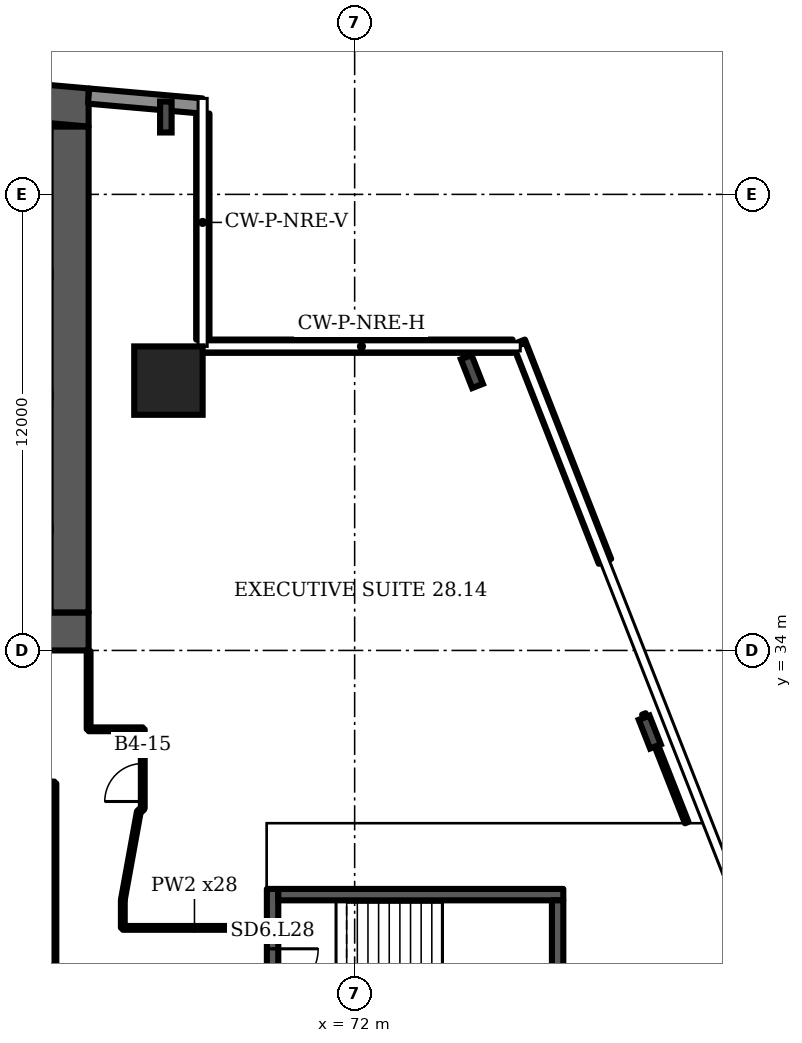
"""IFC4 building model, lengths in metres.
Left out: names, types, materials, properties, quantities, classifications, styles, units other than length and angle.
Written with IfcOpenShell. Run it as: python <this file> out.ifc"""

import sys

from ifc_helpers import new_model, si_unit, direction, frame, frame_2d, origin, origin_2d, place, context, subcontext, project, spatial, polyline, rectangle, i_section, outline, extrude, element, fill, save


model = new_model("IFC4")
c1 = context("Model", 3, precision=1e-05, world=origin(), true_north=direction((0.0, 1.0)))
c2 = subcontext(c1, "Body", "Model", "MODEL_VIEW")
j1 = project(units=[si_unit("LENGTHUNIT", "METRE"), si_unit("PLANEANGLEUNIT", "RADIAN")], contexts=[c1])
p1 = place(None, origin())
s1 = spatial("IfcSite", under=j1, at=p1, CompositionType="ELEMENT")
p2 = place(p1, origin())
s2 = spatial("IfcBuilding", under=s1, at=p2, CompositionType="ELEMENT")
p3 = place(p2, frame((0.0, 0.0, 121.9)))
s3 = spatial("IfcBuildingStorey", under=s2, at=p3, CompositionType="ELEMENT", Elevation=121.9)
p4 = place(p3, origin())
e1 = element("IfcWall", 1, at=p4, inside=s3, PredefinedType="SHEAR", context=c2, shape_type="SweptSolid", body=[
    extrude(outline(polyline([(16.0, 47.784), (40.5, 49.927), (65.0, 47.784), (65.0, 48.787), (40.5, 50.931), (16.0, 48.787), (16.0, 47.784)])), origin(), (0.0, 0.0, 1.0), 3.6),
])
p5 = place(p3, frame((16.0, 34.5, 0.0), z_axis=(0.0, 0.0, 1.0), x_axis=(1.0, 0.0, 0.0)))
e2 = element("IfcWall", 2, at=p5, inside=s3, PredefinedType="SHEAR", context=c2, shape_type="SweptSolid", body=[
    extrude(rectangle(XDim=49.0, YDim=1.0, at=frame_2d((24.5, 0.0))), origin(), (0.0, 0.0, 1.0), 3.6),
])
p6 = place(p5, frame((1.2, 0.0, 0.0)))
e3 = element("IfcOpeningElement", 3, at=p6, cuts=e2, PredefinedType="OPENING", context=c2, shape_type="SweptSolid", body=[
    extrude(rectangle(XDim=1.1, YDim=2.1, at=frame_2d((0.55, 1.05))), frame((0.0, 0.51, 0.0), z_axis=(0.0, -1.0, 0.0), x_axis=(1.0, 0.0, 0.0)), (0.0, 0.0, 1.0), 1.02),
])
p7 = place(p5, frame((5.083, 0.0, 0.0)))
e4 = element("IfcOpeningElement", 4, at=p7, cuts=e2, PredefinedType="OPENING", context=c2, shape_type="SweptSolid", body=[
    extrude(rectangle(XDim=1.1, YDim=2.1, at=frame_2d((0.55, 1.05))), frame((0.0, 0.51, 0.0), z_axis=(0.0, -1.0, 0.0), x_axis=(1.0, 0.0, 0.0)), (0.0, 0.0, 1.0), 1.02),
])
p8 = place(p5, frame((2.933, 0.0, 0.0)))
e5 = element("IfcOpeningElement", 5, at=p8, cuts=e2, PredefinedType="OPENING", context=c2, shape_type="SweptSolid", body=[
    extrude(rectangle(XDim=1.4, YDim=2.1, at=frame_2d((0.7, 1.05))), frame((0.0, 0.51, 0.0), z_axis=(0.0, -1.0, 0.0), x_axis=(1.0, 0.0, 0.0)), (0.0, 0.0, 1.0), 1.02),
])
p9 = place(p5, frame((7.65, 0.0, 0.0)))
e6 = element("IfcOpeningElement", 6, at=p9, cuts=e2, PredefinedType="OPENING", context=c2, shape_type="SweptSolid", body=[
    extrude(rectangle(XDim=1.2, YDim=2.1, at=frame_2d((0.6, 1.05))), frame((0.0, 0.51, 0.0), z_axis=(0.0, -1.0, 0.0), x_axis=(1.0, 0.0, 0.0)), (0.0, 0.0, 1.0), 1.02),
])
p10 = place(p5, frame((14.817, 0.0, 0.0)))
e7 = element("IfcOpeningElement", 7, at=p10, cuts=e2, PredefinedType="OPENING", context=c2, shape_type="SweptSolid", body=[
    extrude(rectangle(XDim=1.1, YDim=2.1, at=frame_2d((0.55, 1.05))), frame((0.0, 0.51, 0.0), z_axis=(0.0, -1.0, 0.0), x_axis=(1.0, 0.0, 0.0)), (0.0, 0.0, 1.0), 1.02),
])
p11 = place(p5, frame((19.083, 0.0, 0.0)))
e8 = element("IfcOpeningElement", 8, at=p11, cuts=e2, PredefinedType="OPENING", context=c2, shape_type="SweptSolid", body=[
    extrude(rectangle(XDim=1.1, YDim=2.1, at=frame_2d((0.55, 1.05))), frame((0.0, 0.51, 0.0), z_axis=(0.0, -1.0, 0.0), x_axis=(1.0, 0.0, 0.0)), (0.0, 0.0, 1.0), 1.02),
])
p12 = place(p5, frame((16.8, 0.0, 0.0)))
e9 = element("IfcOpeningElement", 9, at=p12, cuts=e2, PredefinedType="OPENING", context=c2, shape_type="SweptSolid", body=[
    extrude(rectangle(XDim=1.4, YDim=2.1, at=frame_2d((0.7, 1.05))), frame((0.0, 0.51, 0.0), z_axis=(0.0, -1.0, 0.0), x_axis=(1.0, 0.0, 0.0)), (0.0, 0.0, 1.0), 1.02),
])
p13 = place(p5, frame((21.817, 0.0, 0.0)))
e10 = element("IfcOpeningElement", 10, at=p13, cuts=e2, PredefinedType="OPENING", context=c2, shape_type="SweptSolid", body=[
    extrude(rectangle(XDim=1.1, YDim=2.1, at=frame_2d((0.55, 1.05))), frame((0.0, 0.51, 0.0), z_axis=(0.0, -1.0, 0.0), x_axis=(1.0, 0.0, 0.0)), (0.0, 0.0, 1.0), 1.02),
])
p14 = place(p5, frame((26.083, 0.0, 0.0)))
e11 = element("IfcOpeningElement", 11, at=p14, cuts=e2, PredefinedType="OPENING", context=c2, shape_type="SweptSolid", body=[
    extrude(rectangle(XDim=1.1, YDim=2.1, at=frame_2d((0.55, 1.05))), frame((0.0, 0.51, 0.0), z_axis=(0.0, -1.0, 0.0), x_axis=(1.0, 0.0, 0.0)), (0.0, 0.0, 1.0), 1.02),
])
p15 = place(p5, frame((33.15, 0.0, 0.0)))
e12 = element("IfcOpeningElement", 12, at=p15, cuts=e2, PredefinedType="OPENING", context=c2, shape_type="SweptSolid", body=[
    extrude(rectangle(XDim=1.2, YDim=2.1, at=frame_2d((0.6, 1.05))), frame((0.0, 0.51, 0.0), z_axis=(0.0, -1.0, 0.0), x_axis=(1.0, 0.0, 0.0)), (0.0, 0.0, 1.0), 1.02),
])
p16 = place(p5, frame((37.8, 0.0, 0.0)))
e13 = element("IfcOpeningElement", 13, at=p16, cuts=e2, PredefinedType="OPENING", context=c2, shape_type="SweptSolid", body=[
    extrude(rectangle(XDim=1.4, YDim=2.1, at=frame_2d((0.7, 1.05))), frame((0.0, 0.51, 0.0), z_axis=(0.0, -1.0, 0.0), x_axis=(1.0, 0.0, 0.0)), (0.0, 0.0, 1.0), 1.02),
])
p17 = place(p5, frame((42.817, 0.0, 0.0)))
e14 = element("IfcOpeningElement", 14, at=p17, cuts=e2, PredefinedType="OPENING", context=c2, shape_type="SweptSolid", body=[
    extrude(rectangle(XDim=1.1, YDim=2.1, at=frame_2d((0.55, 1.05))), frame((0.0, 0.51, 0.0), z_axis=(0.0, -1.0, 0.0), x_axis=(1.0, 0.0, 0.0)), (0.0, 0.0, 1.0), 1.02),
])
p18 = place(p5, frame((46.7, 0.0, 0.0)))
e15 = element("IfcOpeningElement", 15, at=p18, cuts=e2, PredefinedType="OPENING", context=c2, shape_type="SweptSolid", body=[
    extrude(rectangle(XDim=1.1, YDim=2.1, at=frame_2d((0.55, 1.05))), frame((0.0, 0.51, 0.0), z_axis=(0.0, -1.0, 0.0), x_axis=(1.0, 0.0, 0.0)), (0.0, 0.0, 1.0), 1.02),
])
p19 = place(p5, frame((44.667, 0.0, 0.0)))
e16 = element("IfcOpeningElement", 16, at=p19, cuts=e2, PredefinedType="OPENING", context=c2, shape_type="SweptSolid", body=[
    extrude(rectangle(XDim=1.4, YDim=2.1, at=frame_2d((0.7, 1.05))), frame((0.0, 0.51, 0.0), z_axis=(0.0, -1.0, 0.0), x_axis=(1.0, 0.0, 0.0)), (0.0, 0.0, 1.0), 1.02),
])
p20 = place(p3, frame((64.5, 35.0, 0.0), z_axis=(0.0, 0.0, 1.0), x_axis=(0.0, 1.0, 0.0)))
e17 = element("IfcWall", 17, at=p20, inside=s3, PredefinedType="SHEAR", context=c2, shape_type="SweptSolid", body=[
    extrude(rectangle(XDim=12.784, YDim=1.0, at=frame_2d((6.392, 0.0))), origin(), (0.0, 0.0, 1.0), 3.6),
])
p21 = place(p3, frame((67.1, 41.1, 0.0), z_axis=(0.0, 0.0, 1.0), x_axis=(1.0, 0.0, 0.0)))
e18 = element("IfcColumn", 18, at=p21, inside=s3, PredefinedType="COLUMN", context=c2, shape_type="SweptSolid", body=[
    extrude(rectangle(XDim=1.8, YDim=1.8, at=origin_2d()), origin(), (0.0, 0.0, 1.0), 3.6),
])
for number, where, z_axis, x_axis in (
    (19, (79.766, 31.853, 0.0), (0.0, 0.0, 1.0), (0.931, 0.366, 0.0)),
    (20, (75.085, 41.338, 0.0), (0.0, 0.0, 1.0), (0.931, 0.366, 0.0)),
    (21, (67.032, 48.036, 0.0), (0.0, 0.0, 1.0), (1.0, 0.0, 0.0)),
):
    element("IfcColumn", number, at=place(p3, frame(where, z_axis=z_axis, x_axis=x_axis)), inside=s3, PredefinedType="COLUMN", context=c2, shape_type="SweptSolid", body=[
        extrude(i_section(OverallWidth=0.303, OverallDepth=0.814, WebThickness=0.021, FlangeThickness=0.04, FilletRadius=0.03, at=origin_2d()), origin(), (0.0, 0.0, 1.0), 3.6),
    ])
p22 = place(p3, frame((67.983, 48.326, 0.0), z_axis=(0.0, 0.0, 1.0), x_axis=(-0.996194, 0.087168, 0.0)))
e22 = element("IfcWall", 22, at=p22, inside=s3, PredefinedType="SOLIDWALL", context=c2, shape_type="SweptSolid", body=[
    extrude(rectangle(XDim=2.994, YDim=0.4, at=frame_2d((1.497, 0.0))), origin(), (0.0, 0.0, 1.0), 3.2),
])
p23 = place(p3, frame((78.586, 36.344, 0.0), z_axis=(0.0, 0.0, 1.0), x_axis=(-0.365792, 0.930699, 0.0)))
e23 = element("IfcWall", 23, at=p23, inside=s3, PredefinedType="SOLIDWALL", context=c2, shape_type="SweptSolid", body=[
    extrude(rectangle(XDim=6.202, YDim=0.35, at=frame_2d((3.101, 0.0))), origin(), (0.0, 0.0, 1.0), 1.0),
])
p24 = place(p3, frame((76.155, 42.005, 0.0), z_axis=(0.0, 0.0, 1.0), x_axis=(-1.0, 0.0, 0.0)))
e24 = element("IfcWall", 24, at=p24, inside=s3, PredefinedType="SOLIDWALL", context=c2, shape_type="SweptSolid", body=[
    extrude(rectangle(XDim=8.155, YDim=0.35, at=frame_2d((4.078, 0.0))), origin(), (0.0, 0.0, 1.0), 1.0),
])
p25 = place(p3, frame((68.005, 42.18, 0.0), z_axis=(0.0, 0.0, 1.0), x_axis=(0.0, 1.0, 0.0)))
e25 = element("IfcWall", 25, at=p25, inside=s3, PredefinedType="SOLIDWALL", context=c2, shape_type="SweptSolid", body=[
    extrude(rectangle(XDim=5.947, YDim=0.35, at=frame_2d((2.973, 0.0))), origin(), (0.0, 0.0, 1.0), 1.0),
])
p26 = place(p3, frame((69.84, 23.375, 0.0), z_axis=(0.0, 0.0, 1.0), x_axis=(0.0, 1.0, 0.0)))
e26 = element("IfcWall", 26, at=p26, inside=s3, PredefinedType="SHEAR", context=c2, shape_type="SweptSolid", body=[
    extrude(rectangle(XDim=4.35, YDim=0.3, at=frame_2d((2.175, 0.0))), origin(), (0.0, 0.0, 1.0), 3.2),
])
p27 = place(p26, frame((1.575, 0.0, 0.0)))
e27 = element("IfcOpeningElement", 27, at=p27, cuts=e26, PredefinedType="OPENING", context=c2, shape_type="SweptSolid", body=[
    extrude(rectangle(XDim=1.2, YDim=2.1, at=frame_2d((0.6, 1.05))), frame((0.0, 0.16, 0.0), z_axis=(0.0, -1.0, 0.0), x_axis=(1.0, 0.0, 0.0)), (0.0, 0.0, 1.0), 0.32),
])
p28 = place(p3, frame((44.51, 30.5, 0.0), z_axis=(0.0, 0.0, 1.0), x_axis=(1.0, 0.0, 0.0)))
e28 = element("IfcWall", 28, at=p28, inside=s3, PredefinedType="PARTITIONING", context=c2, shape_type="SweptSolid", body=[
    extrude(rectangle(XDim=19.59, YDim=0.1, at=frame_2d((9.795, 0.0))), origin(), (0.0, 0.0, 1.0), 3.2),
])
p29 = place(p28, frame((6.41, 0.0, 0.0)))
e29 = element("IfcOpeningElement", 29, at=p29, cuts=e28, PredefinedType="OPENING", context=c2, shape_type="SweptSolid", body=[
    extrude(rectangle(XDim=1.0, YDim=2.1, at=frame_2d((0.5, 1.05))), frame((0.0, 0.06, 0.0), z_axis=(0.0, -1.0, 0.0), x_axis=(1.0, 0.0, 0.0)), (0.0, 0.0, 1.0), 0.12),
])
p30 = place(p28, frame((10.41, 0.0, 0.0)))
e30 = element("IfcOpeningElement", 30, at=p30, cuts=e28, PredefinedType="OPENING", context=c2, shape_type="SweptSolid", body=[
    extrude(rectangle(XDim=1.0, YDim=2.1, at=frame_2d((0.5, 1.05))), frame((0.0, 0.06, 0.0), z_axis=(0.0, -1.0, 0.0), x_axis=(1.0, 0.0, 0.0)), (0.0, 0.0, 1.0), 0.12),
])
p31 = place(p3, frame((64.1, 10.095, 0.0), z_axis=(0.0, 0.0, 1.0), x_axis=(0.0, 1.0, 0.0)))
e31 = element("IfcWall", 31, at=p31, inside=s3, PredefinedType="PARTITIONING", context=c2, shape_type="SweptSolid", body=[
    extrude(rectangle(XDim=20.405, YDim=0.1, at=frame_2d((10.203, 0.0))), origin(), (0.0, 0.0, 1.0), 3.2),
])
p32 = place(p31, frame((8.905, 0.0, 0.0)))
e32 = element("IfcOpeningElement", 32, at=p32, cuts=e31, PredefinedType="OPENING", context=c2, shape_type="SweptSolid", body=[
    extrude(rectangle(XDim=1.0, YDim=2.1, at=frame_2d((0.5, 1.05))), frame((0.0, 0.06, 0.0), z_axis=(0.0, -1.0, 0.0), x_axis=(1.0, 0.0, 0.0)), (0.0, 0.0, 1.0), 0.12),
])
p33 = place(p3, frame((65.0, 31.925, 0.0), z_axis=(0.0, 0.0, 1.0), x_axis=(0.0, 1.0, 0.0)))
e33 = element("IfcWall", 33, at=p33, inside=s3, PredefinedType="PARTITIONING", context=c2, shape_type="SweptSolid", body=[
    extrude(rectangle(XDim=2.055, YDim=0.1, at=frame_2d((1.027, 0.0))), origin(), (0.0, 0.0, 1.0), 3.2),
])
p34 = place(p3, frame((65.0, 31.925, 0.0), z_axis=(0.0, 0.0, 1.0), x_axis=(1.0, 0.0, 0.0)))
e34 = element("IfcWall", 34, at=p34, inside=s3, PredefinedType="PARTITIONING", context=c2, shape_type="SweptSolid", body=[
    extrude(rectangle(XDim=1.425, YDim=0.1, at=frame_2d((0.712, 0.0))), origin(), (0.0, 0.0, 1.0), 3.2),
])
p35 = place(p3, frame((65.9, 26.7, 0.0), z_axis=(0.0, 0.0, 1.0), x_axis=(0.0, 1.0, 0.0)))
e35 = element("IfcWall", 35, at=p35, inside=s3, PredefinedType="PARTITIONING", context=c2, shape_type="SweptSolid", body=[
    extrude(rectangle(XDim=0.735, YDim=0.1, at=frame_2d((0.368, 0.0))), origin(), (0.0, 0.0, 1.0), 3.2),
])
p36 = place(p3, frame((65.9, 26.7, 0.0), z_axis=(0.0, 0.0, 1.0), x_axis=(1.0, 0.0, 0.0)))
e36 = element("IfcWall", 36, at=p36, inside=s3, PredefinedType="PARTITIONING", context=c2, shape_type="SweptSolid", body=[
    extrude(rectangle(XDim=3.771, YDim=0.1, at=frame_2d((1.885, 0.0))), origin(), (0.0, 0.0, 1.0), 3.2),
])
p37 = place(p3, frame((65.9, 27.435, 0.0), z_axis=(0.0, 0.0, 1.0), x_axis=(0.178584, 0.983924, 0.0)))
e37 = element("IfcWall", 37, at=p37, inside=s3, PredefinedType="PARTITIONING", context=c2, shape_type="SweptSolid", body=[
    extrude(rectangle(XDim=2.353, YDim=0.1, at=frame_2d((1.176, 0.0))), origin(), (0.0, 0.0, 1.0), 3.2),
])
p38 = place(p3, frame((66.32, 29.75, 0.0), z_axis=(0.0, 0.0, 1.0), x_axis=(0.741581, 0.670872, 0.0)))
e38 = element("IfcWall", 38, at=p38, inside=s3, PredefinedType="PARTITIONING", context=c2, shape_type="SweptSolid", body=[
    extrude(rectangle(XDim=0.142, YDim=0.1, at=frame_2d((0.071, 0.0))), origin(), (0.0, 0.0, 1.0), 3.2),
])
p39 = place(p3, frame((66.425, 29.845, 0.0), z_axis=(0.0, 0.0, 1.0), x_axis=(0.0, 1.0, 0.0)))
e39 = element("IfcWall", 39, at=p39, inside=s3, PredefinedType="PARTITIONING", context=c2, shape_type="SweptSolid", body=[
    extrude(rectangle(XDim=2.08, YDim=0.1, at=frame_2d((1.04, 0.0))), origin(), (0.0, 0.0, 1.0), 3.2),
])
p40 = place(p39, frame((0.181, 0.0, 0.0)))
e40 = element("IfcOpeningElement", 40, at=p40, cuts=e39, PredefinedType="OPENING", context=c2, shape_type="SweptSolid", body=[
    extrude(rectangle(XDim=1.0, YDim=2.1, at=frame_2d((0.5, 1.05))), frame((0.0, 0.06, 0.0), z_axis=(0.0, -1.0, 0.0), x_axis=(1.0, 0.0, 0.0)), (0.0, 0.0, 1.0), 0.12),
])
p41 = place(p3, frame((80.737, 29.47, 0.0), z_axis=(0.0, 0.0, 1.0), x_axis=(-0.366592, 0.930378, 0.0)))
e41 = element("IfcWall", 41, at=p41, inside=s3, PredefinedType="PARTITIONING", context=c2, shape_type="SweptSolid", body=[
    extrude(rectangle(XDim=3.074, YDim=0.1, at=frame_2d((1.537, 0.0))), origin(), (0.0, 0.0, 1.0), 2.58),
])
p42 = place(p3, frame((69.99, 27.575, 0.0), z_axis=(0.0, 0.0, 1.0), x_axis=(1.0, 0.0, 0.0)))
e42 = element("IfcWall", 42, at=p42, inside=s3, PredefinedType="SHEAR", context=c2, shape_type="SweptSolid", body=[
    extrude(rectangle(XDim=7.5, YDim=0.3, at=frame_2d((3.75, 0.0))), origin(), (0.0, 0.0, 1.0), 3.2),
])
p43 = place(p3, frame((77.34, 23.675, 0.0), z_axis=(0.0, 0.0, 1.0), x_axis=(0.0, 1.0, 0.0)))
e43 = element("IfcWall", 43, at=p43, inside=s3, PredefinedType="SHEAR", context=c2, shape_type="SweptSolid", body=[
    extrude(rectangle(XDim=3.75, YDim=0.3, at=frame_2d((1.875, 0.0))), origin(), (0.0, 0.0, 1.0), 3.2),
])
p44 = place(p27, origin())
e44 = element("IfcDoor", 44, at=p44, inside=s3, OperationType="SINGLE_SWING_RIGHT", PredefinedType="DOOR", context=c2, shape_type="SweptSolid", body=[
    extrude(rectangle(XDim=1.2, YDim=2.1, at=frame_2d((0.6, 1.05))), frame((0.0, 0.025, 0.0), z_axis=(0.0, -1.0, 0.0), x_axis=(1.0, 0.0, 0.0)), (0.0, 0.0, 1.0), 0.05),
])
fill(e27, e44)
p45 = place(p40, origin())
e45 = element("IfcDoor", 45, at=p45, inside=s3, OperationType="SINGLE_SWING_LEFT", PredefinedType="DOOR", context=c2, shape_type="SweptSolid", body=[
    extrude(rectangle(XDim=1.0, YDim=2.1, at=frame_2d((0.5, 1.05))), frame((0.0, 0.025, 0.0), z_axis=(0.0, -1.0, 0.0), x_axis=(1.0, 0.0, 0.0)), (0.0, 0.0, 1.0), 0.05),
])
fill(e40, e45)
save(model, sys.argv[1])
